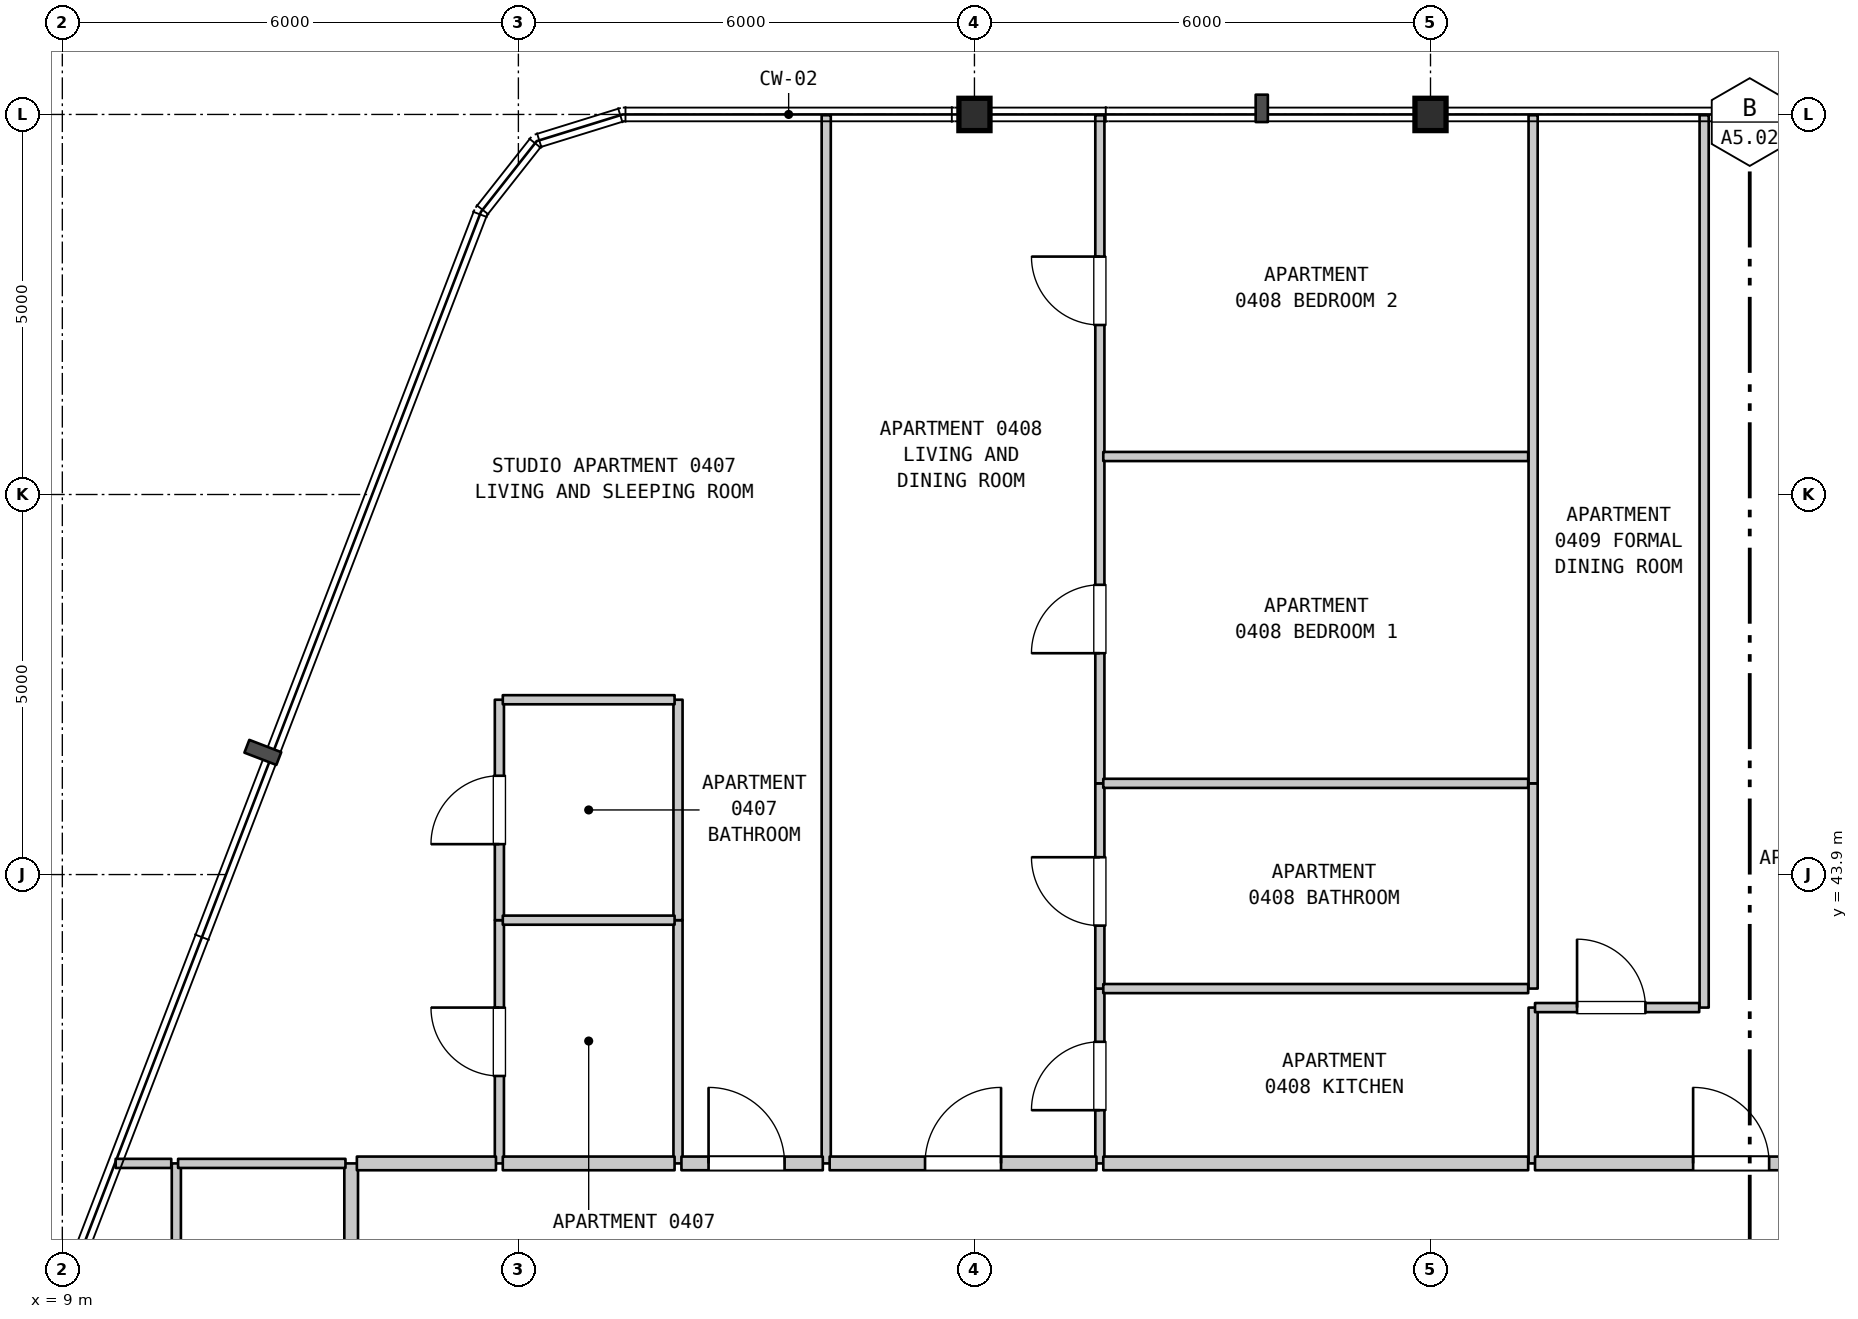
"""IFC4 building model, lengths in metres.
Left out: names, types, materials, properties, quantities, classifications, styles, units other than length and angle.
Written with IfcOpenShell. Run it as: python <this file> out.ifc"""

import sys

from ifc_helpers import new_model, si_unit, direction, frame, frame_2d, origin, origin_2d, place, context, subcontext, project, spatial, rectangle, i_section, extrude, element, fill, save


model = new_model("IFC4")
c1 = context("Model", 3, precision=1e-05, world=origin(), true_north=direction((0.0, 1.0)))
c2 = subcontext(c1, "Body", "Model", "MODEL_VIEW")
j1 = project(units=[si_unit("LENGTHUNIT", "METRE"), si_unit("PLANEANGLEUNIT", "RADIAN")], contexts=[c1])
p1 = place(None, origin())
s1 = spatial("IfcSite", under=j1, at=p1, CompositionType="ELEMENT")
p2 = place(p1, origin())
s2 = spatial("IfcBuilding", under=s1, at=p2, CompositionType="ELEMENT")
p3 = place(p2, frame((0.0, 0.0, 24.0)))
s3 = spatial("IfcBuildingStorey", under=s2, at=p3, CompositionType="ELEMENT", Elevation=24.0)
for number, where, z_axis, x_axis in (
    (1, (21.0, 53.9, 0.0), (0.0, 0.0, 1.0), (1.0, 0.0, 0.0)),
    (2, (27.0, 53.9, 0.0), (0.0, 0.0, 1.0), (1.0, 0.0, 0.0)),
):
    element("IfcColumn", number, at=place(p3, frame(where, z_axis=z_axis, x_axis=x_axis)), inside=s3, PredefinedType="COLUMN", context=c2, shape_type="SweptSolid", body=[
        extrude(i_section(OverallWidth=0.409, OverallDepth=0.425, WebThickness=0.032, FlangeThickness=0.052, FilletRadius=0.015, at=origin_2d()), origin(), (0.0, 0.0, 1.0), 3.7),
    ])
p4 = place(p3, frame((10.5, 31.45, 0.0), z_axis=(0.0, 0.0, 1.0), x_axis=(0.0, 1.0, 0.0)))
e3 = element("IfcWall", 3, at=p4, inside=s3, PredefinedType="PARTITIONING", context=c2, shape_type="SweptSolid", body=[
    extrude(rectangle(XDim=8.65, YDim=0.12, at=frame_2d((4.325, 0.0))), origin(), (0.0, 0.0, 1.0), 3.385),
])
p5 = place(p3, frame((12.8, 31.45, 0.0), z_axis=(0.0, 0.0, 1.0), x_axis=(0.0, 1.0, 0.0)))
e4 = element("IfcWall", 4, at=p5, inside=s3, PredefinedType="STANDARD", context=c2, shape_type="SweptSolid", body=[
    extrude(rectangle(XDim=8.65, YDim=0.18, at=frame_2d((4.325, 0.0))), origin(), (0.0, 0.0, 1.0), 3.385),
])
p6 = place(p3, frame((14.75, 40.1, 0.0), z_axis=(0.0, 0.0, 1.0), x_axis=(0.0, 1.0, 0.0)))
e5 = element("IfcWall", 5, at=p6, inside=s3, PredefinedType="PARTITIONING", context=c2, shape_type="SweptSolid", body=[
    extrude(rectangle(XDim=3.2, YDim=0.12, at=frame_2d((1.6, 0.0))), origin(), (0.0, 0.0, 1.0), 3.385),
])
p7 = place(p6, frame((1.15, 0.0, 0.0)))
e6 = element("IfcOpeningElement", 6, at=p7, cuts=e5, PredefinedType="OPENING", context=c2, shape_type="SweptSolid", body=[
    extrude(rectangle(XDim=0.9, YDim=2.15, at=frame_2d((0.45, 1.075))), frame((0.0, 0.07, 0.0), z_axis=(0.0, -1.0, 0.0), x_axis=(1.0, 0.0, 0.0)), (0.0, 0.0, 1.0), 0.14),
])
p8 = place(p3, frame((14.75, 43.3, 0.0), z_axis=(0.0, 0.0, 1.0), x_axis=(0.0, 1.0, 0.0)))
e7 = element("IfcWall", 7, at=p8, inside=s3, PredefinedType="PARTITIONING", context=c2, shape_type="SweptSolid", body=[
    extrude(rectangle(XDim=2.9, YDim=0.12, at=frame_2d((1.45, 0.0))), origin(), (0.0, 0.0, 1.0), 3.385),
])
p9 = place(p8, frame((1.0, 0.0, 0.0)))
e8 = element("IfcOpeningElement", 8, at=p9, cuts=e7, PredefinedType="OPENING", context=c2, shape_type="SweptSolid", body=[
    extrude(rectangle(XDim=0.9, YDim=2.1, at=frame_2d((0.45, 1.05))), frame((0.0, 0.07, 0.0), z_axis=(0.0, -1.0, 0.0), x_axis=(1.0, 0.0, 0.0)), (0.0, 0.0, 1.0), 0.14),
])
p10 = place(p3, frame((17.1, 40.1, 0.0), z_axis=(0.0, 0.0, 1.0), x_axis=(0.0, 1.0, 0.0)))
e9 = element("IfcWall", 9, at=p10, inside=s3, PredefinedType="PARTITIONING", context=c2, shape_type="SweptSolid", body=[
    extrude(rectangle(XDim=3.2, YDim=0.12, at=frame_2d((1.6, 0.0))), origin(), (0.0, 0.0, 1.0), 3.385),
])
p11 = place(p3, frame((17.1, 43.3, 0.0), z_axis=(0.0, 0.0, 1.0), x_axis=(0.0, 1.0, 0.0)))
e10 = element("IfcWall", 10, at=p11, inside=s3, PredefinedType="PARTITIONING", context=c2, shape_type="SweptSolid", body=[
    extrude(rectangle(XDim=2.9, YDim=0.12, at=frame_2d((1.45, 0.0))), origin(), (0.0, 0.0, 1.0), 3.385),
])
p12 = place(p3, frame((19.05, 40.1, 0.0), z_axis=(0.0, 0.0, 1.0), x_axis=(0.0, 1.0, 0.0)))
e11 = element("IfcWall", 11, at=p12, inside=s3, PredefinedType="PARTITIONING", context=c2, shape_type="SweptSolid", body=[
    extrude(rectangle(XDim=13.79, YDim=0.12, at=frame_2d((6.895, 0.0))), origin(), (0.0, 0.0, 1.0), 3.385),
])
p13 = place(p3, frame((22.65, 40.1, 0.0), z_axis=(0.0, 0.0, 1.0), x_axis=(0.0, 1.0, 0.0)))
e12 = element("IfcWall", 12, at=p13, inside=s3, PredefinedType="PARTITIONING", context=c2, shape_type="SweptSolid", body=[
    extrude(rectangle(XDim=2.3, YDim=0.12, at=frame_2d((1.15, 0.0))), origin(), (0.0, 0.0, 1.0), 3.385),
])
p14 = place(p13, frame((0.7, 0.0, 0.0)))
e13 = element("IfcOpeningElement", 13, at=p14, cuts=e12, PredefinedType="OPENING", context=c2, shape_type="SweptSolid", body=[
    extrude(rectangle(XDim=0.9, YDim=2.15, at=frame_2d((0.45, 1.075))), frame((0.0, 0.07, 0.0), z_axis=(0.0, -1.0, 0.0), x_axis=(1.0, 0.0, 0.0)), (0.0, 0.0, 1.0), 0.14),
])
p15 = place(p3, frame((22.65, 42.4, 0.0), z_axis=(0.0, 0.0, 1.0), x_axis=(0.0, 1.0, 0.0)))
e14 = element("IfcWall", 14, at=p15, inside=s3, PredefinedType="PARTITIONING", context=c2, shape_type="SweptSolid", body=[
    extrude(rectangle(XDim=2.7, YDim=0.12, at=frame_2d((1.35, 0.0))), origin(), (0.0, 0.0, 1.0), 3.385),
])
p16 = place(p15, frame((0.828, 0.0, 0.0)))
e15 = element("IfcOpeningElement", 15, at=p16, cuts=e14, PredefinedType="OPENING", context=c2, shape_type="SweptSolid", body=[
    extrude(rectangle(XDim=0.9, YDim=2.1, at=frame_2d((0.45, 1.05))), frame((0.0, 0.07, 0.0), z_axis=(0.0, -1.0, 0.0), x_axis=(1.0, 0.0, 0.0)), (0.0, 0.0, 1.0), 0.14),
])
p17 = place(p3, frame((22.65, 45.1, 0.0), z_axis=(0.0, 0.0, 1.0), x_axis=(0.0, 1.0, 0.0)))
e16 = element("IfcWall", 16, at=p17, inside=s3, PredefinedType="PARTITIONING", context=c2, shape_type="SweptSolid", body=[
    extrude(rectangle(XDim=8.79, YDim=0.12, at=frame_2d((4.395, 0.0))), origin(), (0.0, 0.0, 1.0), 3.385),
])
p18 = place(p17, frame((1.712, 0.0, 0.0)))
e17 = element("IfcOpeningElement", 17, at=p18, cuts=e16, PredefinedType="OPENING", context=c2, shape_type="SweptSolid", body=[
    extrude(rectangle(XDim=0.9, YDim=2.15, at=frame_2d((0.45, 1.075))), frame((0.0, 0.07, 0.0), z_axis=(0.0, -1.0, 0.0), x_axis=(1.0, 0.0, 0.0)), (0.0, 0.0, 1.0), 0.14),
])
p19 = place(p17, frame((6.03, 0.0, 0.0)))
e18 = element("IfcOpeningElement", 18, at=p19, cuts=e16, PredefinedType="OPENING", context=c2, shape_type="SweptSolid", body=[
    extrude(rectangle(XDim=0.9, YDim=2.15, at=frame_2d((0.45, 1.075))), frame((0.0, 0.07, 0.0), z_axis=(0.0, -1.0, 0.0), x_axis=(1.0, 0.0, 0.0)), (0.0, 0.0, 1.0), 0.14),
])
p20 = place(p3, frame((28.35, 40.1, 0.0), z_axis=(0.0, 0.0, 1.0), x_axis=(0.0, 1.0, 0.0)))
e19 = element("IfcWall", 19, at=p20, inside=s3, PredefinedType="PARTITIONING", context=c2, shape_type="SweptSolid", body=[
    extrude(rectangle(XDim=2.05, YDim=0.12, at=frame_2d((1.025, 0.0))), origin(), (0.0, 0.0, 1.0), 3.385),
])
p21 = place(p3, frame((28.35, 42.4, 0.0), z_axis=(0.0, 0.0, 1.0), x_axis=(0.0, 1.0, 0.0)))
e20 = element("IfcWall", 20, at=p21, inside=s3, PredefinedType="PARTITIONING", context=c2, shape_type="SweptSolid", body=[
    extrude(rectangle(XDim=2.7, YDim=0.12, at=frame_2d((1.35, 0.0))), origin(), (0.0, 0.0, 1.0), 3.385),
])
p22 = place(p3, frame((28.35, 45.1, 0.0), z_axis=(0.0, 0.0, 1.0), x_axis=(0.0, 1.0, 0.0)))
e21 = element("IfcWall", 21, at=p22, inside=s3, PredefinedType="PARTITIONING", context=c2, shape_type="SweptSolid", body=[
    extrude(rectangle(XDim=8.79, YDim=0.12, at=frame_2d((4.395, 0.0))), origin(), (0.0, 0.0, 1.0), 3.385),
])
p23 = place(p3, frame((30.6, 42.15, 0.0), z_axis=(0.0, 0.0, 1.0), x_axis=(0.0, 1.0, 0.0)))
e22 = element("IfcWall", 22, at=p23, inside=s3, PredefinedType="PARTITIONING", context=c2, shape_type="SweptSolid", body=[
    extrude(rectangle(XDim=11.74, YDim=0.12, at=frame_2d((5.87, 0.0))), origin(), (0.0, 0.0, 1.0), 3.385),
])
p24 = place(p3, frame((9.702, 40.1, 0.0), z_axis=(0.0, 0.0, 1.0), x_axis=(1.0, 0.0, 0.0)))
e23 = element("IfcWall", 23, at=p24, inside=s3, PredefinedType="PARTITIONING", context=c2, shape_type="SweptSolid", body=[
    extrude(rectangle(XDim=0.731, YDim=0.12, at=frame_2d((0.366, 0.0))), origin(), (0.0, 0.0, 1.0), 3.385),
])
p25 = place(p3, frame((10.523, 40.1, 0.0), z_axis=(0.0, 0.0, 1.0), x_axis=(1.0, 0.0, 0.0)))
e24 = element("IfcWall", 24, at=p25, inside=s3, PredefinedType="PARTITIONING", context=c2, shape_type="SweptSolid", body=[
    extrude(rectangle(XDim=2.202, YDim=0.12, at=frame_2d((1.101, 0.0))), origin(), (0.0, 0.0, 1.0), 3.385),
])
p26 = place(p3, frame((12.875, 40.1, 0.0), z_axis=(0.0, 0.0, 1.0), x_axis=(1.0, 0.0, 0.0)))
e25 = element("IfcWall", 25, at=p26, inside=s3, PredefinedType="STANDARD", context=c2, shape_type="SweptSolid", body=[
    extrude(rectangle(XDim=1.83, YDim=0.18, at=frame_2d((0.915, 0.0))), origin(), (0.0, 0.0, 1.0), 3.385),
])
p27 = place(p3, frame((14.795, 40.1, 0.0), z_axis=(0.0, 0.0, 1.0), x_axis=(1.0, 0.0, 0.0)))
e26 = element("IfcWall", 26, at=p27, inside=s3, PredefinedType="STANDARD", context=c2, shape_type="SweptSolid", body=[
    extrude(rectangle(XDim=2.26, YDim=0.18, at=frame_2d((1.13, 0.0))), origin(), (0.0, 0.0, 1.0), 3.385),
])
p28 = place(p3, frame((17.145, 40.1, 0.0), z_axis=(0.0, 0.0, 1.0), x_axis=(1.0, 0.0, 0.0)))
e27 = element("IfcWall", 27, at=p28, inside=s3, PredefinedType="STANDARD", context=c2, shape_type="SweptSolid", body=[
    extrude(rectangle(XDim=1.86, YDim=0.18, at=frame_2d((0.93, 0.0))), origin(), (0.0, 0.0, 1.0), 3.385),
])
p29 = place(p28, frame((0.357, 0.0, 0.0)))
e28 = element("IfcOpeningElement", 28, at=p29, cuts=e27, PredefinedType="OPENING", context=c2, shape_type="SweptSolid", body=[
    extrude(rectangle(XDim=1.0, YDim=2.15, at=frame_2d((0.5, 1.075))), frame((0.0, 0.1, 0.0), z_axis=(0.0, -1.0, 0.0), x_axis=(1.0, 0.0, 0.0)), (0.0, 0.0, 1.0), 0.2),
])
p30 = place(p3, frame((19.095, 40.1, 0.0), z_axis=(0.0, 0.0, 1.0), x_axis=(1.0, 0.0, 0.0)))
e29 = element("IfcWall", 29, at=p30, inside=s3, PredefinedType="STANDARD", context=c2, shape_type="SweptSolid", body=[
    extrude(rectangle(XDim=3.51, YDim=0.18, at=frame_2d((1.755, 0.0))), origin(), (0.0, 0.0, 1.0), 3.385),
])
p31 = place(p30, frame((1.255, 0.0, 0.0)))
e30 = element("IfcOpeningElement", 30, at=p31, cuts=e29, PredefinedType="OPENING", context=c2, shape_type="SweptSolid", body=[
    extrude(rectangle(XDim=1.0, YDim=2.15, at=frame_2d((0.5, 1.075))), frame((0.0, 0.1, 0.0), z_axis=(0.0, -1.0, 0.0), x_axis=(1.0, 0.0, 0.0)), (0.0, 0.0, 1.0), 0.2),
])
p32 = place(p3, frame((22.695, 40.1, 0.0), z_axis=(0.0, 0.0, 1.0), x_axis=(1.0, 0.0, 0.0)))
e31 = element("IfcWall", 31, at=p32, inside=s3, PredefinedType="STANDARD", context=c2, shape_type="SweptSolid", body=[
    extrude(rectangle(XDim=5.59, YDim=0.18, at=frame_2d((2.795, 0.0))), origin(), (0.0, 0.0, 1.0), 3.385),
])
p33 = place(p3, frame((28.375, 40.1, 0.0), z_axis=(0.0, 0.0, 1.0), x_axis=(1.0, 0.0, 0.0)))
e32 = element("IfcWall", 32, at=p33, inside=s3, PredefinedType="STANDARD", context=c2, shape_type="SweptSolid", body=[
    extrude(rectangle(XDim=5.095, YDim=0.18, at=frame_2d((2.547, 0.0))), origin(), (0.0, 0.0, 1.0), 3.385),
])
p34 = place(p33, frame((2.08, 0.0, 0.0)))
e33 = element("IfcOpeningElement", 33, at=p34, cuts=e32, PredefinedType="OPENING", context=c2, shape_type="SweptSolid", body=[
    extrude(rectangle(XDim=1.0, YDim=2.15, at=frame_2d((0.5, 1.075))), frame((0.0, 0.1, 0.0), z_axis=(0.0, -1.0, 0.0), x_axis=(1.0, 0.0, 0.0)), (0.0, 0.0, 1.0), 0.2),
])
p35 = place(p3, frame((28.375, 42.15, 0.0), z_axis=(0.0, 0.0, 1.0), x_axis=(1.0, 0.0, 0.0)))
e34 = element("IfcWall", 34, at=p35, inside=s3, PredefinedType="PARTITIONING", context=c2, shape_type="SweptSolid", body=[
    extrude(rectangle(XDim=2.16, YDim=0.12, at=frame_2d((1.08, 0.0))), origin(), (0.0, 0.0, 1.0), 3.385),
])
p36 = place(p35, frame((0.553, 0.0, 0.0)))
e35 = element("IfcOpeningElement", 35, at=p36, cuts=e34, PredefinedType="OPENING", context=c2, shape_type="SweptSolid", body=[
    extrude(rectangle(XDim=0.9, YDim=2.15, at=frame_2d((0.45, 1.075))), frame((0.0, 0.07, 0.0), z_axis=(0.0, -1.0, 0.0), x_axis=(1.0, 0.0, 0.0)), (0.0, 0.0, 1.0), 0.14),
])
p37 = place(p3, frame((22.695, 42.4, 0.0), z_axis=(0.0, 0.0, 1.0), x_axis=(1.0, 0.0, 0.0)))
e36 = element("IfcWall", 36, at=p37, inside=s3, PredefinedType="PARTITIONING", context=c2, shape_type="SweptSolid", body=[
    extrude(rectangle(XDim=5.59, YDim=0.12, at=frame_2d((2.795, 0.0))), origin(), (0.0, 0.0, 1.0), 3.385),
])
p38 = place(p3, frame((14.795, 43.3, 0.0), z_axis=(0.0, 0.0, 1.0), x_axis=(1.0, 0.0, 0.0)))
e37 = element("IfcWall", 37, at=p38, inside=s3, PredefinedType="PARTITIONING", context=c2, shape_type="SweptSolid", body=[
    extrude(rectangle(XDim=2.26, YDim=0.12, at=frame_2d((1.13, 0.0))), origin(), (0.0, 0.0, 1.0), 3.385),
])
p39 = place(p3, frame((22.695, 45.1, 0.0), z_axis=(0.0, 0.0, 1.0), x_axis=(1.0, 0.0, 0.0)))
e38 = element("IfcWall", 38, at=p39, inside=s3, PredefinedType="PARTITIONING", context=c2, shape_type="SweptSolid", body=[
    extrude(rectangle(XDim=5.59, YDim=0.12, at=frame_2d((2.795, 0.0))), origin(), (0.0, 0.0, 1.0), 3.385),
])
p40 = place(p3, frame((14.795, 46.2, 0.0), z_axis=(0.0, 0.0, 1.0), x_axis=(1.0, 0.0, 0.0)))
e39 = element("IfcWall", 39, at=p40, inside=s3, PredefinedType="PARTITIONING", context=c2, shape_type="SweptSolid", body=[
    extrude(rectangle(XDim=2.26, YDim=0.12, at=frame_2d((1.13, 0.0))), origin(), (0.0, 0.0, 1.0), 3.385),
])
p41 = place(p3, frame((22.695, 49.4, 0.0), z_axis=(0.0, 0.0, 1.0), x_axis=(1.0, 0.0, 0.0)))
e40 = element("IfcWall", 40, at=p41, inside=s3, PredefinedType="PARTITIONING", context=c2, shape_type="SweptSolid", body=[
    extrude(rectangle(XDim=5.59, YDim=0.12, at=frame_2d((2.795, 0.0))), origin(), (0.0, 0.0, 1.0), 3.385),
])
p42 = place(p7, origin())
e41 = element("IfcDoor", 41, at=p42, inside=s3, OperationType="SINGLE_SWING_RIGHT", PredefinedType="DOOR", context=c2, shape_type="SweptSolid", body=[
    extrude(rectangle(XDim=0.9, YDim=2.15, at=frame_2d((0.45, 1.075))), frame((0.0, 0.025, 0.0), z_axis=(0.0, -1.0, 0.0), x_axis=(1.0, 0.0, 0.0)), (0.0, 0.0, 1.0), 0.05),
])
fill(e6, e41)
p43 = place(p9, origin())
e42 = element("IfcDoor", 42, at=p43, inside=s3, OperationType="SINGLE_SWING_LEFT", PredefinedType="DOOR", context=c2, shape_type="SweptSolid", body=[
    extrude(rectangle(XDim=0.9, YDim=2.1, at=frame_2d((0.45, 1.05))), frame((0.0, 0.025, 0.0), z_axis=(0.0, -1.0, 0.0), x_axis=(1.0, 0.0, 0.0)), (0.0, 0.0, 1.0), 0.05),
])
fill(e8, e42)
p44 = place(p14, origin())
e43 = element("IfcDoor", 43, at=p44, inside=s3, OperationType="SINGLE_SWING_LEFT", PredefinedType="DOOR", context=c2, shape_type="SweptSolid", body=[
    extrude(rectangle(XDim=0.9, YDim=2.15, at=frame_2d((0.45, 1.075))), frame((0.0, 0.025, 0.0), z_axis=(0.0, -1.0, 0.0), x_axis=(1.0, 0.0, 0.0)), (0.0, 0.0, 1.0), 0.05),
])
fill(e13, e43)
p45 = place(p16, origin())
e44 = element("IfcDoor", 44, at=p45, inside=s3, OperationType="SINGLE_SWING_RIGHT", PredefinedType="DOOR", context=c2, shape_type="SweptSolid", body=[
    extrude(rectangle(XDim=0.9, YDim=2.1, at=frame_2d((0.45, 1.05))), frame((0.0, 0.025, 0.0), z_axis=(0.0, -1.0, 0.0), x_axis=(1.0, 0.0, 0.0)), (0.0, 0.0, 1.0), 0.05),
])
fill(e15, e44)
p46 = place(p18, origin())
e45 = element("IfcDoor", 45, at=p46, inside=s3, OperationType="SINGLE_SWING_LEFT", PredefinedType="DOOR", context=c2, shape_type="SweptSolid", body=[
    extrude(rectangle(XDim=0.9, YDim=2.15, at=frame_2d((0.45, 1.075))), frame((0.0, 0.025, 0.0), z_axis=(0.0, -1.0, 0.0), x_axis=(1.0, 0.0, 0.0)), (0.0, 0.0, 1.0), 0.05),
])
fill(e17, e45)
p47 = place(p19, origin())
e46 = element("IfcDoor", 46, at=p47, inside=s3, OperationType="SINGLE_SWING_RIGHT", PredefinedType="DOOR", context=c2, shape_type="SweptSolid", body=[
    extrude(rectangle(XDim=0.9, YDim=2.15, at=frame_2d((0.45, 1.075))), frame((0.0, 0.025, 0.0), z_axis=(0.0, -1.0, 0.0), x_axis=(1.0, 0.0, 0.0)), (0.0, 0.0, 1.0), 0.05),
])
fill(e18, e46)
p48 = place(p29, origin())
e47 = element("IfcDoor", 47, at=p48, inside=s3, OperationType="SINGLE_SWING_LEFT", PredefinedType="DOOR", context=c2, shape_type="SweptSolid", body=[
    extrude(rectangle(XDim=1.0, YDim=2.15, at=frame_2d((0.5, 1.075))), frame((0.0, 0.025, 0.0), z_axis=(0.0, -1.0, 0.0), x_axis=(1.0, 0.0, 0.0)), (0.0, 0.0, 1.0), 0.05),
])
fill(e28, e47)
p49 = place(p31, origin())
e48 = element("IfcDoor", 48, at=p49, inside=s3, OperationType="SINGLE_SWING_RIGHT", PredefinedType="DOOR", context=c2, shape_type="SweptSolid", body=[
    extrude(rectangle(XDim=1.0, YDim=2.15, at=frame_2d((0.5, 1.075))), frame((0.0, 0.025, 0.0), z_axis=(0.0, -1.0, 0.0), x_axis=(1.0, 0.0, 0.0)), (0.0, 0.0, 1.0), 0.05),
])
fill(e30, e48)
p50 = place(p34, origin())
e49 = element("IfcDoor", 49, at=p50, inside=s3, OperationType="SINGLE_SWING_LEFT", PredefinedType="DOOR", context=c2, shape_type="SweptSolid", body=[
    extrude(rectangle(XDim=1.0, YDim=2.15, at=frame_2d((0.5, 1.075))), frame((0.0, 0.025, 0.0), z_axis=(0.0, -1.0, 0.0), x_axis=(1.0, 0.0, 0.0)), (0.0, 0.0, 1.0), 0.05),
])
fill(e33, e49)
p51 = place(p36, origin())
e50 = element("IfcDoor", 50, at=p51, inside=s3, OperationType="SINGLE_SWING_LEFT", PredefinedType="DOOR", context=c2, shape_type="SweptSolid", body=[
    extrude(rectangle(XDim=0.9, YDim=2.15, at=frame_2d((0.45, 1.075))), frame((0.0, 0.025, 0.0), z_axis=(0.0, -1.0, 0.0), x_axis=(1.0, 0.0, 0.0)), (0.0, 0.0, 1.0), 0.05),
])
fill(e35, e50)
save(model, sys.argv[1])
